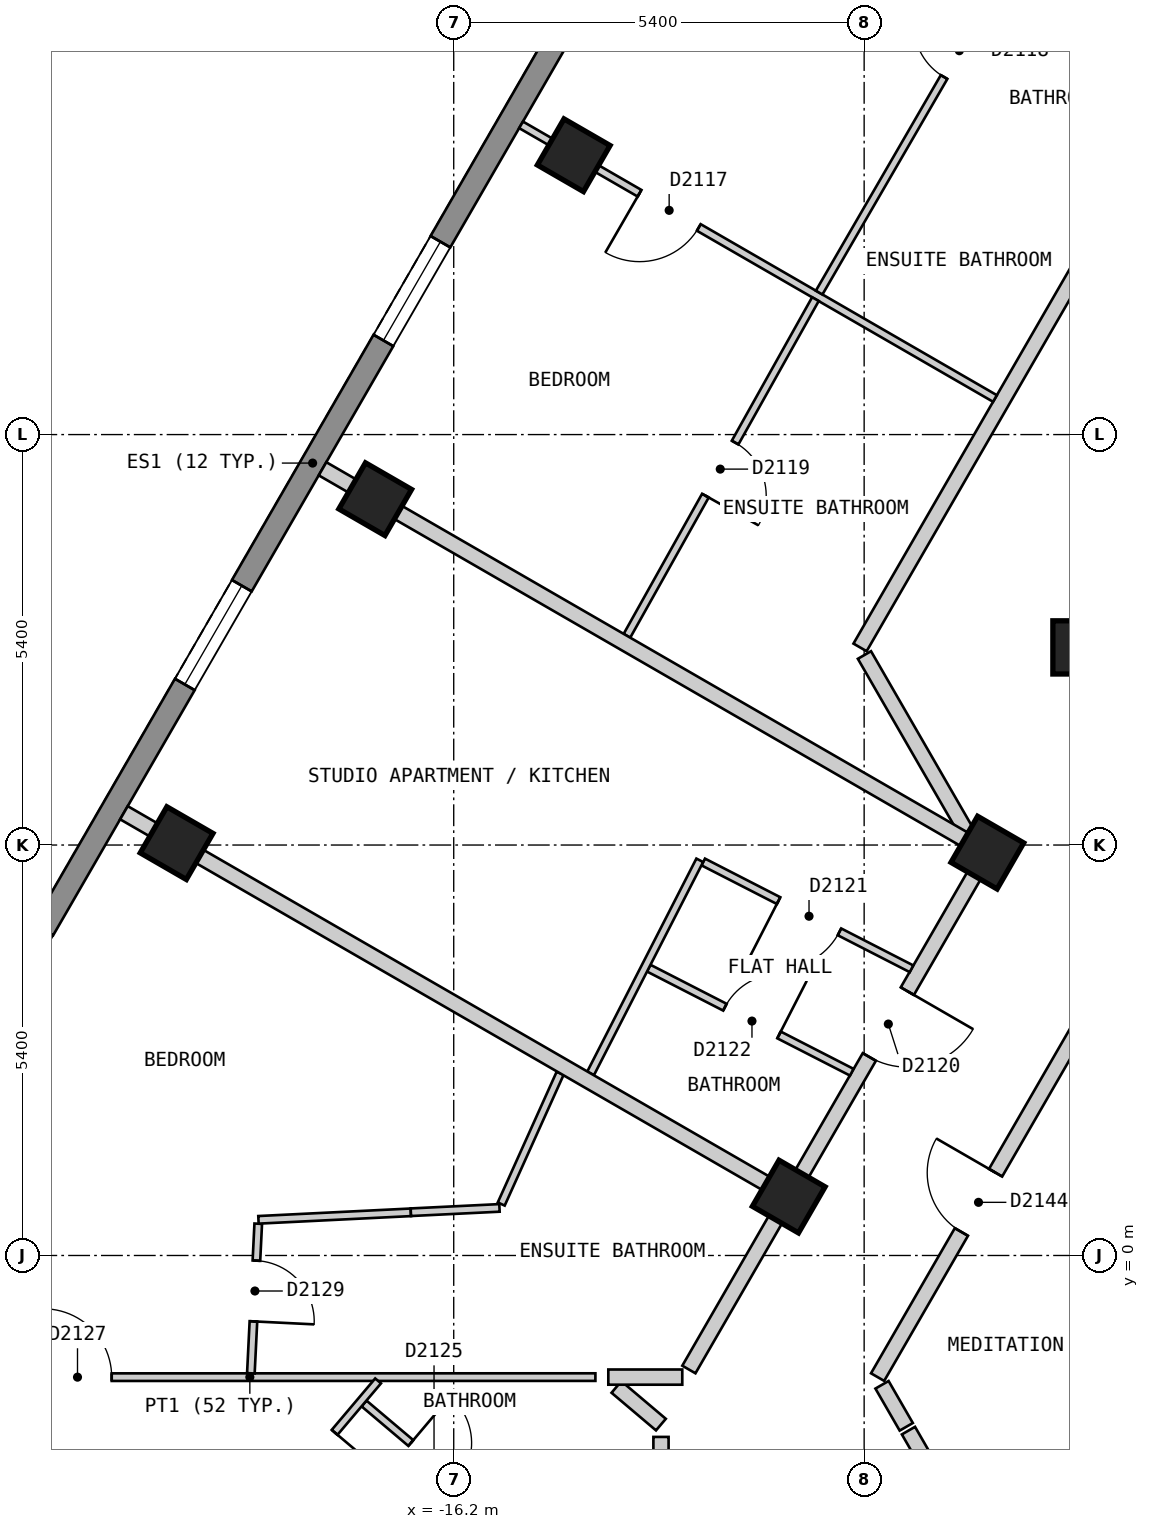
"""IFC4 building model, lengths in metres.
Left out: names, types, materials, properties, quantities, classifications, styles, units other than length and angle.
Written with IfcOpenShell. Run it as: python <this file> out.ifc"""

import sys

from ifc_helpers import new_model, si_unit, direction, frame, frame_2d, origin, origin_2d, place, context, subcontext, project, spatial, polyline, rectangle, outline, extrude, element, fill, save


model = new_model("IFC4")
c1 = context("Model", 3, precision=1e-05, world=origin(), true_north=direction((0.0, 1.0)))
c2 = subcontext(c1, "Body", "Model", "MODEL_VIEW")
j1 = project(units=[si_unit("LENGTHUNIT", "METRE"), si_unit("PLANEANGLEUNIT", "RADIAN")], contexts=[c1])
p1 = place(None, origin())
s1 = spatial("IfcSite", under=j1, at=p1, CompositionType="ELEMENT")
p2 = place(p1, origin())
s2 = spatial("IfcBuilding", under=s1, at=p2, CompositionType="ELEMENT")
p3 = place(p2, frame((0.0, 0.0, 217.8)))
s3 = spatial("IfcBuildingStorey", under=s2, at=p3, CompositionType="ELEMENT", Elevation=217.8)
for number, where, z_axis, x_axis in (
    (1, (-14.621, 14.475, 0.0), (0.0, 0.0, 1.0), (-0.5, -0.866, 0.0)),
    (2, (-17.233, 9.95, 0.0), (0.0, 0.0, 1.0), (-0.5, -0.866, 0.0)),
    (3, (-19.846, 5.425, 0.0), (0.0, 0.0, 1.0), (-0.5, -0.866, 0.0)),
    (4, (-7.967, 8.0, 0.0), (0.0, 0.0, 1.0), (1.0, 0.0, 0.0)),
    (5, (-9.179, 5.3, 0.0), (0.0, 0.0, 1.0), (-0.5, -0.866, 0.0)),
    (6, (-11.792, 0.775, 0.0), (0.0, 0.0, 1.0), (-0.5, -0.866, 0.0)),
):
    element("IfcColumn", number, at=place(p3, frame(where, z_axis=z_axis, x_axis=x_axis)), inside=s3, PredefinedType="COLUMN", context=c2, shape_type="SweptSolid", body=[
        extrude(rectangle(XDim=0.7, YDim=0.7, at=origin_2d()), origin(), (0.0, 0.0, 1.0), 3.0),
    ])
p4 = place(p3, frame((-12.514, 20.025, 0.0), z_axis=(0.0, 0.0, 1.0), x_axis=(-0.500003656944, -0.866023292436, 0.0)))
e7 = element("IfcWall", 7, at=p4, inside=s3, PredefinedType="SOLIDWALL", context=c2, shape_type="SweptSolid", body=[
    extrude(outline(polyline([(0.0, -0.15), (22.17, -0.15), (22.09, 0.15), (0.08, 0.15), (0.0, -0.15)])), origin(), (0.0, 0.0, 1.0), 2.7),
])
p5 = place(p4, frame((2.497, 0.0, 0.15)))
e8 = element("IfcOpeningElement", 8, at=p5, cuts=e7, PredefinedType="OPENING", context=c2, shape_type="SweptSolid", body=[
    extrude(rectangle(XDim=1.5, YDim=2.1, at=frame_2d((0.75, 1.05))), frame((0.0, 0.16, 0.0), z_axis=(0.0, -1.0, 0.0), x_axis=(1.0, 0.0, 0.0)), (0.0, 0.0, 1.0), 0.32),
])
p6 = place(p4, frame((7.722, 0.0, 0.15)))
e9 = element("IfcOpeningElement", 9, at=p6, cuts=e7, PredefinedType="OPENING", context=c2, shape_type="SweptSolid", body=[
    extrude(rectangle(XDim=1.5, YDim=2.1, at=frame_2d((0.75, 1.05))), frame((0.0, 0.16, 0.0), z_axis=(0.0, -1.0, 0.0), x_axis=(1.0, 0.0, 0.0)), (0.0, 0.0, 1.0), 0.32),
])
p7 = place(p4, frame((12.948, 0.0, 0.15)))
e10 = element("IfcOpeningElement", 10, at=p7, cuts=e7, PredefinedType="OPENING", context=c2, shape_type="SweptSolid", body=[
    extrude(rectangle(XDim=1.5, YDim=2.1, at=frame_2d((0.75, 1.05))), frame((0.0, 0.16, 0.0), z_axis=(0.0, -1.0, 0.0), x_axis=(1.0, 0.0, 0.0)), (0.0, 0.0, 1.0), 0.32),
])
p8 = place(p4, frame((18.173, 0.0, 0.15)))
e11 = element("IfcOpeningElement", 11, at=p8, cuts=e7, PredefinedType="OPENING", context=c2, shape_type="SweptSolid", body=[
    extrude(rectangle(XDim=1.5, YDim=2.1, at=frame_2d((0.75, 1.05))), frame((0.0, 0.16, 0.0), z_axis=(0.0, -1.0, 0.0), x_axis=(1.0, 0.0, 0.0)), (0.0, 0.0, 1.0), 0.32),
])
p9 = place(p3, frame((-10.796, 7.9, 0.0), z_axis=(0.0, 0.0, 1.0), x_axis=(0.499698840221, -0.866199208659, 0.0)))
e12 = element("IfcWall", 12, at=p9, inside=s3, PredefinedType="PARTITIONING", context=c2, shape_type="SweptSolid", body=[
    extrude(rectangle(XDim=2.685, YDim=0.2, at=frame_2d((1.343, 0.0))), origin(), (0.0, 0.0, 1.0), 2.7),
])
p10 = place(p3, frame((-10.565, -1.701, 0.0), z_axis=(0.0, 0.0, 1.0), x_axis=(0.499512735409, -0.866306543416, 0.0)))
e13 = element("IfcWall", 13, at=p10, inside=s3, PredefinedType="PARTITIONING", context=c2, shape_type="SweptSolid", body=[
    extrude(rectangle(XDim=0.638, YDim=0.2, at=frame_2d((0.319, 0.0))), origin(), (0.0, 0.0, 1.0), 2.7),
])
p11 = place(p3, frame((-10.217, -2.304, 0.0), z_axis=(0.0, 0.0, 1.0), x_axis=(0.499013081552, -0.866594452117, 0.0)))
e14 = element("IfcWall", 14, at=p11, inside=s3, PredefinedType="PARTITIONING", context=c2, shape_type="SweptSolid", body=[
    extrude(rectangle(XDim=0.457, YDim=0.2, at=frame_2d((0.229, 0.0))), origin(), (0.0, 0.0, 1.0), 2.7),
])
p12 = place(p3, frame((-10.623, -1.6, 0.0), z_axis=(0.0, 0.0, 1.0), x_axis=(0.500040865889, 0.866001808567, 0.0)))
e15 = element("IfcWall", 15, at=p12, inside=s3, PredefinedType="PARTITIONING", context=c2, shape_type="SweptSolid", body=[
    extrude(rectangle(XDim=5.31, YDim=0.2, at=frame_2d((2.655, 0.0))), origin(), (0.0, 0.0, 1.0), 2.7),
])
p13 = place(p12, frame((2.205, 0.0, 0.0)))
e16 = element("IfcOpeningElement", 16, at=p13, cuts=e15, PredefinedType="OPENING", context=c2, shape_type="SweptSolid", body=[
    extrude(rectangle(XDim=0.9, YDim=2.1, at=frame_2d((0.45, 1.05))), frame((0.0, 0.11, 0.0), z_axis=(0.0, -1.0, 0.0), x_axis=(1.0, 0.0, 0.0)), (0.0, 0.0, 1.0), 0.22),
])
p14 = place(p3, frame((-13.106, -1.5, 0.0), z_axis=(0.0, 0.0, 1.0), x_axis=(0.500025705601, 0.86601056214, 0.0)))
e17 = element("IfcWall", 17, at=p14, inside=s3, PredefinedType="PARTITIONING", context=c2, shape_type="SweptSolid", body=[
    extrude(rectangle(XDim=7.735, YDim=0.2, at=frame_2d((3.868, 0.0))), origin(), (0.0, 0.0, 1.0), 2.7),
])
p15 = place(p14, frame((4.748, 0.0, 0.0)))
e18 = element("IfcOpeningElement", 18, at=p15, cuts=e17, PredefinedType="OPENING", context=c2, shape_type="SweptSolid", body=[
    extrude(rectangle(XDim=1.0, YDim=2.1, at=frame_2d((0.5, 1.05))), frame((0.0, 0.11, 0.0), z_axis=(0.0, -1.0, 0.0), x_axis=(1.0, 0.0, 0.0)), (0.0, 0.0, 1.0), 0.22),
])
p16 = place(p3, frame((-10.854, 8.0, 0.0), z_axis=(0.0, 0.0, 1.0), x_axis=(0.499997637144, 0.866026767976, 0.0)))
e19 = element("IfcWall", 19, at=p16, inside=s3, PredefinedType="PARTITIONING", context=c2, shape_type="SweptSolid", body=[
    extrude(rectangle(XDim=10.854, YDim=0.2, at=frame_2d((5.427, 0.0))), origin(), (0.0, 0.0, 1.0), 2.7),
])
p17 = place(p16, frame((9.754, 0.0, 0.0)))
e20 = element("IfcOpeningElement", 20, at=p17, cuts=e19, PredefinedType="OPENING", context=c2, shape_type="SweptSolid", body=[
    extrude(rectangle(XDim=1.0, YDim=2.1, at=frame_2d((0.5, 1.05))), frame((0.0, 0.11, 0.0), z_axis=(0.0, -1.0, 0.0), x_axis=(1.0, 0.0, 0.0)), (0.0, 0.0, 1.0), 0.22),
])
p18 = place(p3, frame((-13.473, -2.799, 0.0), z_axis=(0.0, 0.0, 1.0), x_axis=(0.0, 1.0, 0.0)))
e21 = element("IfcWall", 21, at=p18, inside=s3, PredefinedType="PARTITIONING", context=c2, shape_type="SweptSolid", body=[
    extrude(rectangle(XDim=0.412, YDim=0.2, at=frame_2d((0.206, 0.0))), origin(), (0.0, 0.0, 1.0), 2.7),
])
p19 = place(p3, frame((-12.917, 5.177, 0.0), z_axis=(0.0, 0.0, 1.0), x_axis=(0.889829844516, -0.456292502467, 0.0)))
e22 = element("IfcWall", 22, at=p19, inside=s3, PredefinedType="PARTITIONING", context=c2, shape_type="SweptSolid", body=[
    extrude(rectangle(XDim=3.079, YDim=0.1, at=frame_2d((1.54, 0.0))), origin(), (0.0, 0.0, 1.0), 2.7),
])
p20 = place(p19, frame((1.114, 0.0, 0.0)))
e23 = element("IfcOpeningElement", 23, at=p20, cuts=e22, PredefinedType="OPENING", context=c2, shape_type="SweptSolid", body=[
    extrude(rectangle(XDim=0.9, YDim=2.1, at=frame_2d((0.45, 1.05))), frame((0.0, 0.06, 0.0), z_axis=(0.0, -1.0, 0.0), x_axis=(1.0, 0.0, 0.0)), (0.0, 0.0, 1.0), 0.12),
])
p21 = place(p3, frame((-13.634, 3.78, 0.0), z_axis=(0.0, 0.0, 1.0), x_axis=(0.889908901513, -0.456138298116, 0.0)))
e24 = element("IfcWall", 24, at=p21, inside=s3, PredefinedType="PARTITIONING", context=c2, shape_type="SweptSolid", body=[
    extrude(rectangle(XDim=3.002, YDim=0.1, at=frame_2d((1.501, 0.0))), origin(), (0.0, 0.0, 1.0), 2.7),
])
p22 = place(p21, frame((1.126, 0.0, 0.0)))
e25 = element("IfcOpeningElement", 25, at=p22, cuts=e24, PredefinedType="OPENING", context=c2, shape_type="SweptSolid", body=[
    extrude(rectangle(XDim=0.8, YDim=2.1, at=frame_2d((0.4, 1.05))), frame((0.0, 0.06, 0.0), z_axis=(0.0, -1.0, 0.0), x_axis=(1.0, 0.0, 0.0)), (0.0, 0.0, 1.0), 0.12),
])
p23 = place(p3, frame((-15.314, 14.875, 0.0), z_axis=(0.0, 0.0, 1.0), x_axis=(0.866001485781, -0.500041424909, 0.0)))
e26 = element("IfcWall", 26, at=p23, inside=s3, PredefinedType="PARTITIONING", context=c2, shape_type="SweptSolid", body=[
    extrude(rectangle(XDim=7.2, YDim=0.1, at=frame_2d((3.6, 0.0))), origin(), (0.0, 0.0, 1.0), 2.7),
])
p24 = place(p23, frame((1.8, 0.0, 0.0)))
e27 = element("IfcOpeningElement", 27, at=p24, cuts=e26, PredefinedType="OPENING", context=c2, shape_type="SweptSolid", body=[
    extrude(rectangle(XDim=0.9, YDim=2.1, at=frame_2d((0.45, 1.05))), frame((0.0, 0.06, 0.0), z_axis=(0.0, -1.0, 0.0), x_axis=(1.0, 0.0, 0.0)), (0.0, 0.0, 1.0), 0.12),
])
p25 = place(p3, frame((-17.38, -1.947, 0.0), z_axis=(0.0, 0.0, 1.0), x_axis=(0.763616683524, -0.645669854217, 0.0)))
e28 = element("IfcWall", 28, at=p25, inside=s3, PredefinedType="PARTITIONING", context=c2, shape_type="SweptSolid", body=[
    extrude(rectangle(XDim=2.331, YDim=0.1, at=frame_2d((1.166, 0.0))), origin(), (0.0, 0.0, 1.0), 2.7),
])
p26 = place(p25, frame((0.806, 0.0, 0.0)))
e29 = element("IfcOpeningElement", 29, at=p26, cuts=e28, PredefinedType="OPENING", context=c2, shape_type="SweptSolid", body=[
    extrude(rectangle(XDim=0.8, YDim=2.1, at=frame_2d((0.4, 1.05))), frame((0.0, 0.06, 0.0), z_axis=(0.0, -1.0, 0.0), x_axis=(1.0, 0.0, 0.0)), (0.0, 0.0, 1.0), 0.12),
])
p27 = place(p3, frame((-23.429, -1.601, 0.0), z_axis=(0.0, 0.0, 1.0), x_axis=(0.999999994233, 0.000107396965, 0.0)))
e30 = element("IfcWall", 30, at=p27, inside=s3, PredefinedType="PARTITIONING", context=c2, shape_type="SweptSolid", body=[
    extrude(rectangle(XDim=9.093, YDim=0.1, at=frame_2d((4.546, 0.0))), origin(), (0.0, 0.0, 1.0), 2.7),
])
p28 = place(p27, frame((1.829, 0.0, 0.0)))
e31 = element("IfcOpeningElement", 31, at=p28, cuts=e30, PredefinedType="OPENING", context=c2, shape_type="SweptSolid", body=[
    extrude(rectangle(XDim=0.9, YDim=2.1, at=frame_2d((0.45, 1.05))), frame((0.0, 0.06, 0.0), z_axis=(0.0, -1.0, 0.0), x_axis=(1.0, 0.0, 0.0)), (0.0, 0.0, 1.0), 0.12),
])
p29 = place(p3, frame((-20.188, -5.191, 0.0), z_axis=(0.0, 0.0, 1.0), x_axis=(0.645524337256, 0.763739700429, 0.0)))
e32 = element("IfcWall", 32, at=p29, inside=s3, PredefinedType="PARTITIONING", context=c2, shape_type="SweptSolid", body=[
    extrude(rectangle(XDim=4.636, YDim=0.1, at=frame_2d((2.318, 0.0))), origin(), (0.0, 0.0, 1.0), 2.7),
])
p30 = place(p29, frame((2.85, 0.0, 0.0)))
e33 = element("IfcOpeningElement", 33, at=p30, cuts=e32, PredefinedType="OPENING", context=c2, shape_type="SweptSolid", body=[
    extrude(rectangle(XDim=0.9, YDim=2.1, at=frame_2d((0.45, 1.05))), frame((0.0, 0.06, 0.0), z_axis=(0.0, -1.0, 0.0), x_axis=(1.0, 0.0, 0.0)), (0.0, 0.0, 1.0), 0.12),
])
p31 = place(p3, frame((-15.575, 0.677, 0.0), z_axis=(0.0, 0.0, 1.0), x_axis=(0.410768223147, 0.911739802165, 0.0)))
e34 = element("IfcWall", 34, at=p31, inside=s3, PredefinedType="PARTITIONING", context=c2, shape_type="SweptSolid", body=[
    extrude(rectangle(XDim=1.886, YDim=0.1, at=frame_2d((0.943, 0.0))), origin(), (0.0, 0.0, 1.0), 2.7),
])
p32 = place(p3, frame((-11.392, 12.668, 0.0), z_axis=(0.0, 0.0, 1.0), x_axis=(0.501440551074, 0.865192102217, 0.0)))
e35 = element("IfcWall", 35, at=p32, inside=s3, PredefinedType="PARTITIONING", context=c2, shape_type="SweptSolid", body=[
    extrude(rectangle(XDim=7.307, YDim=0.1, at=frame_2d((3.654, 0.0))), origin(), (0.0, 0.0, 1.0), 2.7),
])
p33 = place(p32, frame((3.278, 0.0, 0.0)))
e36 = element("IfcOpeningElement", 36, at=p33, cuts=e35, PredefinedType="OPENING", context=c2, shape_type="SweptSolid", body=[
    extrude(rectangle(XDim=0.8, YDim=2.1, at=frame_2d((0.4, 1.05))), frame((0.0, 0.06, 0.0), z_axis=(0.0, -1.0, 0.0), x_axis=(1.0, 0.0, 0.0)), (0.0, 0.0, 1.0), 0.12),
])
p34 = place(p3, frame((-13.921, 8.153, 0.0), z_axis=(0.0, 0.0, 1.0), x_axis=(0.488568218554, 0.872525699231, 0.0)))
e37 = element("IfcWall", 37, at=p34, inside=s3, PredefinedType="PARTITIONING", context=c2, shape_type="SweptSolid", body=[
    extrude(rectangle(XDim=5.076, YDim=0.1, at=frame_2d((2.538, 0.0))), origin(), (0.0, 0.0, 1.0), 2.7),
])
p35 = place(p34, frame((2.113, 0.0, 0.0)))
e38 = element("IfcOpeningElement", 38, at=p35, cuts=e37, PredefinedType="OPENING", context=c2, shape_type="SweptSolid", body=[
    extrude(rectangle(XDim=0.8, YDim=2.1, at=frame_2d((0.4, 1.05))), frame((0.0, 0.06, 0.0), z_axis=(0.0, -1.0, 0.0), x_axis=(1.0, 0.0, 0.0)), (0.0, 0.0, 1.0), 0.12),
])
p36 = place(p3, frame((-14.399, 2.396, 0.0), z_axis=(0.0, 0.0, 1.0), x_axis=(0.455967231787, 0.889996563778, 0.0)))
e39 = element("IfcWall", 39, at=p36, inside=s3, PredefinedType="PARTITIONING", context=c2, shape_type="SweptSolid", body=[
    extrude(rectangle(XDim=3.149, YDim=0.1, at=frame_2d((1.575, 0.0))), origin(), (0.0, 0.0, 1.0), 2.7),
])
p37 = place(p3, frame((-18.869, -1.55, 0.0), z_axis=(0.0, 0.0, 1.0), x_axis=(0.049189853645, 0.998789446429, 0.0)))
e40 = element("IfcWall", 40, at=p37, inside=s3, PredefinedType="PARTITIONING", context=c2, shape_type="SweptSolid", body=[
    extrude(rectangle(XDim=1.97, YDim=0.1, at=frame_2d((0.985, 0.0))), origin(), (0.0, 0.0, 1.0), 2.7),
])
p38 = place(p37, frame((0.684, 0.0, 0.0)))
e41 = element("IfcOpeningElement", 41, at=p38, cuts=e40, PredefinedType="OPENING", context=c2, shape_type="SweptSolid", body=[
    extrude(rectangle(XDim=0.8, YDim=2.1, at=frame_2d((0.4, 1.05))), frame((0.0, 0.06, 0.0), z_axis=(0.0, -1.0, 0.0), x_axis=(1.0, 0.0, 0.0)), (0.0, 0.0, 1.0), 0.12),
])
p39 = place(p3, frame((-18.769, 0.469, 0.0), z_axis=(0.0, 0.0, 1.0), x_axis=(0.998780383332, 0.049373534108, 0.0)))
e42 = element("IfcWall", 42, at=p39, inside=s3, PredefinedType="PARTITIONING", context=c2, shape_type="SweptSolid", body=[
    extrude(rectangle(XDim=2.008, YDim=0.1, at=frame_2d((1.004, 0.0))), origin(), (0.0, 0.0, 1.0), 2.7),
])
p40 = place(p3, frame((-16.764, 0.569, 0.0), z_axis=(0.0, 0.0, 1.0), x_axis=(0.998812102885, 0.048727642373, 0.0)))
e43 = element("IfcWall", 43, at=p40, inside=s3, PredefinedType="PARTITIONING", context=c2, shape_type="SweptSolid", body=[
    extrude(rectangle(XDim=1.167, YDim=0.1, at=frame_2d((0.584, 0.0))), origin(), (0.0, 0.0, 1.0), 2.7),
])
p41 = place(p3, frame((-20.539, 5.825, 0.0), z_axis=(0.0, 0.0, 1.0), x_axis=(0.866046068403, -0.499964206122, 0.0)))
e44 = element("IfcWall", 44, at=p41, inside=s3, PredefinedType="PARTITIONING", context=c2, shape_type="SweptSolid", body=[
    extrude(rectangle(XDim=9.995, YDim=0.2, at=frame_2d((4.998, 0.0))), origin(), (0.0, 0.0, 1.0), 2.7),
])
p42 = place(p3, frame((-17.926, 10.35, 0.0), z_axis=(0.0, 0.0, 1.0), x_axis=(0.866018411306, -0.500012111133, 0.0)))
e45 = element("IfcWall", 45, at=p42, inside=s3, PredefinedType="PARTITIONING", context=c2, shape_type="SweptSolid", body=[
    extrude(rectangle(XDim=9.898, YDim=0.2, at=frame_2d((4.949, 0.0))), origin(), (0.0, 0.0, 1.0), 2.7),
])
p43 = place(p3, frame((-14.059, -1.73, 0.0), z_axis=(0.0, 0.0, 1.0), x_axis=(0.763289607824, -0.64605647941, 0.0)))
e46 = element("IfcWall", 46, at=p43, inside=s3, PredefinedType="PARTITIONING", context=c2, shape_type="SweptSolid", body=[
    extrude(rectangle(XDim=0.766, YDim=0.2, at=frame_2d((0.383, 0.0))), origin(), (0.0, 0.0, 1.0), 2.7),
])
p44 = place(p3, frame((-14.166, -1.6, 0.0), z_axis=(0.0, 0.0, 1.0), x_axis=(1.0, 0.0, 0.0)))
e47 = element("IfcWall", 47, at=p44, inside=s3, PredefinedType="PARTITIONING", context=c2, shape_type="SweptSolid", body=[
    extrude(rectangle(XDim=0.973, YDim=0.2, at=frame_2d((0.486, 0.0))), origin(), (0.0, 0.0, 1.0), 2.7),
])
p45 = place(p6, origin())
e48 = element("IfcWindow", 48, at=p45, inside=s3, PartitioningType="SINGLE_PANEL", PredefinedType="WINDOW", context=c2, shape_type="SweptSolid", body=[
    extrude(rectangle(XDim=1.5, YDim=2.1, at=frame_2d((0.75, 1.05))), frame((0.0, 0.03, 0.0), z_axis=(0.0, -1.0, 0.0), x_axis=(1.0, 0.0, 0.0)), (0.0, 0.0, 1.0), 0.06),
])
fill(e9, e48)
p46 = place(p7, origin())
e49 = element("IfcWindow", 49, at=p46, inside=s3, PartitioningType="SINGLE_PANEL", PredefinedType="WINDOW", context=c2, shape_type="SweptSolid", body=[
    extrude(rectangle(XDim=1.5, YDim=2.1, at=frame_2d((0.75, 1.05))), frame((0.0, 0.03, 0.0), z_axis=(0.0, -1.0, 0.0), x_axis=(1.0, 0.0, 0.0)), (0.0, 0.0, 1.0), 0.06),
])
fill(e10, e49)
p47 = place(p24, origin())
e50 = element("IfcDoor", 50, at=p47, inside=s3, OperationType="SINGLE_SWING_LEFT", PredefinedType="DOOR", context=c2, shape_type="SweptSolid", body=[
    extrude(rectangle(XDim=0.9, YDim=2.1, at=frame_2d((0.45, 1.05))), frame((0.0, 0.025, 0.0), z_axis=(0.0, -1.0, 0.0), x_axis=(1.0, 0.0, 0.0)), (0.0, 0.0, 1.0), 0.05),
])
fill(e27, e50)
p48 = place(p33, origin())
e51 = element("IfcDoor", 51, at=p48, inside=s3, OperationType="SINGLE_SWING_RIGHT", PredefinedType="DOOR", context=c2, shape_type="SweptSolid", body=[
    extrude(rectangle(XDim=0.8, YDim=2.1, at=frame_2d((0.4, 1.05))), frame((0.0, 0.025, 0.0), z_axis=(0.0, -1.0, 0.0), x_axis=(1.0, 0.0, 0.0)), (0.0, 0.0, 1.0), 0.05),
])
fill(e36, e51)
p49 = place(p35, origin())
e52 = element("IfcDoor", 52, at=p49, inside=s3, OperationType="SINGLE_SWING_LEFT", PredefinedType="DOOR", context=c2, shape_type="SweptSolid", body=[
    extrude(rectangle(XDim=0.8, YDim=2.1, at=frame_2d((0.4, 1.05))), frame((0.0, 0.025, 0.0), z_axis=(0.0, -1.0, 0.0), x_axis=(1.0, 0.0, 0.0)), (0.0, 0.0, 1.0), 0.05),
])
fill(e38, e52)
p50 = place(p15, origin())
e53 = element("IfcDoor", 53, at=p50, inside=s3, OperationType="SINGLE_SWING_RIGHT", PredefinedType="DOOR", context=c2, shape_type="SweptSolid", body=[
    extrude(rectangle(XDim=1.0, YDim=2.1, at=frame_2d((0.5, 1.05))), frame((0.0, 0.025, 0.0), z_axis=(0.0, -1.0, 0.0), x_axis=(1.0, 0.0, 0.0)), (0.0, 0.0, 1.0), 0.05),
])
fill(e18, e53)
p51 = place(p20, origin())
e54 = element("IfcDoor", 54, at=p51, inside=s3, OperationType="SINGLE_SWING_LEFT", PredefinedType="DOOR", context=c2, shape_type="SweptSolid", body=[
    extrude(rectangle(XDim=0.9, YDim=2.1, at=frame_2d((0.45, 1.05))), frame((0.0, 0.025, 0.0), z_axis=(0.0, -1.0, 0.0), x_axis=(1.0, 0.0, 0.0)), (0.0, 0.0, 1.0), 0.05),
])
fill(e23, e54)
p52 = place(p22, origin())
e55 = element("IfcDoor", 55, at=p52, inside=s3, OperationType="SINGLE_SWING_RIGHT", PredefinedType="DOOR", context=c2, shape_type="SweptSolid", body=[
    extrude(rectangle(XDim=0.8, YDim=2.1, at=frame_2d((0.4, 1.05))), frame((0.0, 0.025, 0.0), z_axis=(0.0, -1.0, 0.0), x_axis=(1.0, 0.0, 0.0)), (0.0, 0.0, 1.0), 0.05),
])
fill(e25, e55)
p53 = place(p26, origin())
e56 = element("IfcDoor", 56, at=p53, inside=s3, OperationType="SINGLE_SWING_LEFT", PredefinedType="DOOR", context=c2, shape_type="SweptSolid", body=[
    extrude(rectangle(XDim=0.8, YDim=2.1, at=frame_2d((0.4, 1.05))), frame((0.0, 0.025, 0.0), z_axis=(0.0, -1.0, 0.0), x_axis=(1.0, 0.0, 0.0)), (0.0, 0.0, 1.0), 0.05),
])
fill(e29, e56)
p54 = place(p30, origin())
e57 = element("IfcDoor", 57, at=p54, inside=s3, OperationType="SINGLE_SWING_RIGHT", PredefinedType="DOOR", context=c2, shape_type="SweptSolid", body=[
    extrude(rectangle(XDim=0.9, YDim=2.1, at=frame_2d((0.45, 1.05))), frame((0.0, 0.025, 0.0), z_axis=(0.0, -1.0, 0.0), x_axis=(1.0, 0.0, 0.0)), (0.0, 0.0, 1.0), 0.05),
])
fill(e33, e57)
p55 = place(p28, origin())
e58 = element("IfcDoor", 58, at=p55, inside=s3, OperationType="SINGLE_SWING_LEFT", PredefinedType="DOOR", context=c2, shape_type="SweptSolid", body=[
    extrude(rectangle(XDim=0.9, YDim=2.1, at=frame_2d((0.45, 1.05))), frame((0.0, 0.025, 0.0), z_axis=(0.0, -1.0, 0.0), x_axis=(1.0, 0.0, 0.0)), (0.0, 0.0, 1.0), 0.05),
])
fill(e31, e58)
p56 = place(p38, origin())
e59 = element("IfcDoor", 59, at=p56, inside=s3, OperationType="SINGLE_SWING_LEFT", PredefinedType="DOOR", context=c2, shape_type="SweptSolid", body=[
    extrude(rectangle(XDim=0.8, YDim=2.1, at=frame_2d((0.4, 1.05))), frame((0.0, 0.025, 0.0), z_axis=(0.0, -1.0, 0.0), x_axis=(1.0, 0.0, 0.0)), (0.0, 0.0, 1.0), 0.05),
])
fill(e41, e59)
p57 = place(p13, origin())
e60 = element("IfcDoor", 60, at=p57, inside=s3, OperationType="SINGLE_SWING_RIGHT", PredefinedType="DOOR", context=c2, shape_type="SweptSolid", body=[
    extrude(rectangle(XDim=0.9, YDim=2.1, at=frame_2d((0.45, 1.05))), frame((0.0, 0.025, 0.0), z_axis=(0.0, -1.0, 0.0), x_axis=(1.0, 0.0, 0.0)), (0.0, 0.0, 1.0), 0.05),
])
fill(e16, e60)
save(model, sys.argv[1])
